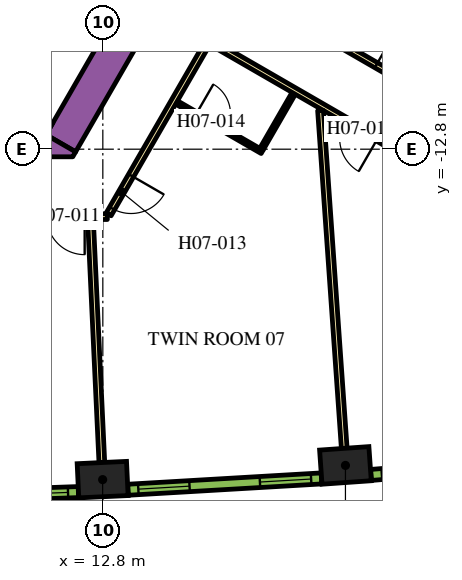
"""IFC4 building model, lengths in metres.
Left out: names, types, materials, properties, quantities, classifications, styles, units other than length and angle.
Written with IfcOpenShell. Run it as: python <this file> out.ifc"""

import sys

from ifc_helpers import new_model, si_unit, direction, frame, frame_2d, origin, origin_2d, place, context, subcontext, project, spatial, polyline, rectangle, outline, extrude, element, fill, save


model = new_model("IFC4")
c1 = context("Model", 3, precision=1e-05, world=origin(), true_north=direction((0.0, 1.0)))
c2 = subcontext(c1, "Body", "Model", "MODEL_VIEW")
j1 = project(units=[si_unit("LENGTHUNIT", "METRE"), si_unit("PLANEANGLEUNIT", "RADIAN")], contexts=[c1])
p1 = place(None, origin())
s1 = spatial("IfcSite", under=j1, at=p1, CompositionType="ELEMENT")
p2 = place(p1, origin())
s2 = spatial("IfcBuilding", under=s1, at=p2, CompositionType="ELEMENT")
p3 = place(p2, frame((0.0, 0.0, 95.4)))
s3 = spatial("IfcBuildingStorey", under=s2, at=p3, CompositionType="ELEMENT", Elevation=95.4)
for number, where, z_axis, x_axis in (
    (1, (12.795, -21.494, 0.0), (0.0, 0.0, 1.0), (0.999, 0.047, 0.0)),
    (2, (19.184, -21.12, 0.0), (0.0, 0.0, 1.0), (0.998, 0.07, 0.0)),
):
    element("IfcColumn", number, at=place(p3, frame(where, z_axis=z_axis, x_axis=x_axis)), inside=s3, PredefinedType="COLUMN", context=c2, shape_type="SweptSolid", body=[
        extrude(rectangle(XDim=1.3, YDim=0.9, at=origin_2d()), origin(), (0.0, 0.0, 1.0), 3.9),
    ])
p4 = place(p3, frame((11.695, -12.644, 0.0), z_axis=(0.0, 0.0, 1.0), x_axis=(0.500010229568, 0.86601949766, 0.0)))
e3 = element("IfcWall", 3, at=p4, inside=s3, PredefinedType="SOLIDWALL", context=c2, shape_type="SweptSolid", body=[
    extrude(rectangle(XDim=9.326, YDim=0.9, at=frame_2d((4.663, 0.0))), origin(), (0.0, 0.0, 1.0), 3.9),
])
p5 = place(p3, origin())
e4 = element("IfcWall", 4, at=p5, inside=s3, PredefinedType="SOLIDWALL", context=c2, shape_type="SweptSolid", body=[
    extrude(outline(polyline([(12.009, -13.0), (11.312, -13.0), (11.312, -12.425), (12.083, -12.871), (12.009, -13.0)])), origin(), (0.0, 0.0, 1.0), 3.9),
])
e5 = element("IfcWall", 5, at=p5, inside=s3, PredefinedType="SOLIDWALL", context=c2, shape_type="SweptSolid", body=[
    extrude(outline(polyline([(11.489, -12.1), (11.312, -12.407), (11.312, -12.1), (11.489, -12.1)])), origin(), (0.0, 0.0, 1.0), 3.9),
])
p6 = place(p3, frame((16.412, -8.523, 0.0), z_axis=(0.0, 0.0, 1.0), x_axis=(0.866025629663, -0.499999608766, 0.0)))
e6 = element("IfcWall", 6, at=p6, inside=s3, PredefinedType="PARTITIONING", context=c2, shape_type="SweptSolid", body=[
    extrude(rectangle(XDim=13.624, YDim=0.15, at=frame_2d((6.812, 0.0))), origin(), (0.0, 0.0, 1.0), 2.75),
])
p7 = place(p6, frame((4.134, 0.0, 0.0)))
e7 = element("IfcOpeningElement", 7, at=p7, cuts=e6, PredefinedType="OPENING", context=c2, shape_type="SweptSolid", body=[
    extrude(rectangle(XDim=1.0, YDim=2.1, at=frame_2d((0.5, 1.05))), frame((0.0, 0.085, 0.0), z_axis=(0.0, -1.0, 0.0), x_axis=(1.0, 0.0, 0.0)), (0.0, 0.0, 1.0), 0.17),
])
p8 = place(p3, frame((12.918, -14.575, 0.0), z_axis=(0.0, 0.0, 1.0), x_axis=(-1.0, 0.0, 0.0)))
e8 = element("IfcWall", 8, at=p8, inside=s3, PredefinedType="PARTITIONING", context=c2, shape_type="SweptSolid", body=[
    extrude(rectangle(XDim=25.766, YDim=0.15, at=frame_2d((12.883, 0.0))), origin(), (0.0, 0.0, 1.0), 2.75),
])
p9 = place(p8, frame((24.24, 0.0, 0.0)))
e9 = element("IfcOpeningElement", 9, at=p9, cuts=e8, PredefinedType="OPENING", context=c2, shape_type="SweptSolid", body=[
    extrude(rectangle(XDim=1.0, YDim=2.1, at=frame_2d((0.5, 1.05))), frame((0.0, 0.085, 0.0), z_axis=(0.0, -1.0, 0.0), x_axis=(1.0, 0.0, 0.0)), (0.0, 0.0, 1.0), 0.17),
])
p10 = place(p8, frame((13.144, 0.0, 0.0)))
e10 = element("IfcOpeningElement", 10, at=p10, cuts=e8, PredefinedType="OPENING", context=c2, shape_type="SweptSolid", body=[
    extrude(rectangle(XDim=1.0, YDim=2.1, at=frame_2d((0.5, 1.05))), frame((0.0, 0.085, 0.0), z_axis=(0.0, -1.0, 0.0), x_axis=(1.0, 0.0, 0.0)), (0.0, 0.0, 1.0), 0.17),
])
p11 = place(p8, frame((11.693, 0.0, 0.0)))
e11 = element("IfcOpeningElement", 11, at=p11, cuts=e8, PredefinedType="OPENING", context=c2, shape_type="SweptSolid", body=[
    extrude(rectangle(XDim=1.0, YDim=2.1, at=frame_2d((0.5, 1.05))), frame((0.0, 0.085, 0.0), z_axis=(0.0, -1.0, 0.0), x_axis=(1.0, 0.0, 0.0)), (0.0, 0.0, 1.0), 0.17),
])
p12 = place(p8, frame((0.596, 0.0, 0.0)))
e12 = element("IfcOpeningElement", 12, at=p12, cuts=e8, PredefinedType="OPENING", context=c2, shape_type="SweptSolid", body=[
    extrude(rectangle(XDim=1.0, YDim=2.1, at=frame_2d((0.5, 1.05))), frame((0.0, 0.085, 0.0), z_axis=(0.0, -1.0, 0.0), x_axis=(1.0, 0.0, 0.0)), (0.0, 0.0, 1.0), 0.17),
])
p13 = place(p3, frame((15.587, -9.952, 0.0), z_axis=(0.0, 0.0, 1.0), x_axis=(-0.500016618951, -0.866015808616, 0.0)))
e13 = element("IfcWall", 13, at=p13, inside=s3, PredefinedType="PARTITIONING", context=c2, shape_type="SweptSolid", body=[
    extrude(rectangle(XDim=5.268, YDim=0.15, at=frame_2d((2.634, 0.0))), origin(), (0.0, 0.0, 1.0), 2.75),
])
p14 = place(p13, frame((4.088, 0.0, 0.0)))
e14 = element("IfcOpeningElement", 14, at=p14, cuts=e13, PredefinedType="OPENING", context=c2, shape_type="SweptSolid", body=[
    extrude(rectangle(XDim=1.0, YDim=2.1, at=frame_2d((0.5, 1.05))), frame((0.0, 0.085, 0.0), z_axis=(0.0, -1.0, 0.0), x_axis=(1.0, 0.0, 0.0)), (0.0, 0.0, 1.0), 0.17),
])
p15 = place(p3, frame((27.386, -16.764, 0.0), z_axis=(0.0, 0.0, 1.0), x_axis=(-0.866022585856, 0.500004880763, 0.0)))
e15 = element("IfcWall", 15, at=p15, inside=s3, PredefinedType="PARTITIONING", context=c2, shape_type="SweptSolid", body=[
    extrude(rectangle(XDim=13.544, YDim=0.15, at=frame_2d((6.772, 0.0))), origin(), (0.0, 0.0, 1.0), 2.75),
])
p16 = place(p15, frame((8.491, 0.0, 0.0)))
e16 = element("IfcOpeningElement", 16, at=p16, cuts=e15, PredefinedType="OPENING", context=c2, shape_type="SweptSolid", body=[
    extrude(rectangle(XDim=1.0, YDim=2.1, at=frame_2d((0.5, 1.05))), frame((0.0, 0.085, 0.0), z_axis=(0.0, -1.0, 0.0), x_axis=(1.0, 0.0, 0.0)), (0.0, 0.0, 1.0), 0.17),
])
p17 = place(p3, frame((12.774, -21.045, 0.0), z_axis=(0.0, 0.0, 1.0), x_axis=(-0.046750341626, 0.998906605023, 0.0)))
e17 = element("IfcWall", 17, at=p17, inside=s3, PredefinedType="PARTITIONING", context=c2, shape_type="SweptSolid", body=[
    extrude(rectangle(XDim=6.392, YDim=0.15, at=frame_2d((3.196, 0.0))), origin(), (0.0, 0.0, 1.0), 2.75),
])
p18 = place(p3, frame((19.153, -20.671, 0.0), z_axis=(0.0, 0.0, 1.0), x_axis=(-0.070070736723, 0.997542025107, 0.0)))
e18 = element("IfcWall", 18, at=p18, inside=s3, PredefinedType="PARTITIONING", context=c2, shape_type="SweptSolid", body=[
    extrude(rectangle(XDim=8.909, YDim=0.15, at=frame_2d((4.455, 0.0))), origin(), (0.0, 0.0, 1.0), 2.75),
])
p19 = place(p3, frame((14.74, -11.57, 0.0), z_axis=(0.0, 0.0, 1.0), x_axis=(0.866021400173, -0.500006934395, 0.0)))
e19 = element("IfcWall", 19, at=p19, inside=s3, PredefinedType="PARTITIONING", context=c2, shape_type="SweptSolid", body=[
    extrude(rectangle(XDim=2.6, YDim=0.1, at=frame_2d((1.3, 0.0))), origin(), (0.0, 0.0, 1.0), 2.75),
])
p20 = place(p19, frame((0.6, 0.0, 0.0)))
e20 = element("IfcOpeningElement", 20, at=p20, cuts=e19, PredefinedType="OPENING", context=c2, shape_type="SweptSolid", body=[
    extrude(rectangle(XDim=0.9, YDim=2.1, at=frame_2d((0.45, 1.05))), frame((0.0, 0.06, 0.0), z_axis=(0.0, -1.0, 0.0), x_axis=(1.0, 0.0, 0.0)), (0.0, 0.0, 1.0), 0.12),
])
p21 = place(p3, frame((16.978, -12.793, 0.0), z_axis=(0.0, 0.0, 1.0), x_axis=(0.500147619332, 0.865940158947, 0.0)))
e21 = element("IfcWall", 21, at=p21, inside=s3, PredefinedType="PARTITIONING", context=c2, shape_type="SweptSolid", body=[
    extrude(rectangle(XDim=1.69, YDim=0.1, at=frame_2d((0.845, 0.0))), origin(), (0.0, 0.0, 1.0), 2.75),
])
p22 = place(p3, frame((7.059, -22.001, 0.0), z_axis=(0.0, 0.0, 1.0), x_axis=(0.999385993957, 0.035037623812, 0.0)))
e22 = element("IfcWall", 22, at=p22, inside=s3, PredefinedType="SOLIDWALL", context=c2, shape_type="SweptSolid", body=[
    extrude(rectangle(XDim=5.101, YDim=0.29, at=frame_2d((2.55, 0.0))), origin(), (0.0, 0.0, 1.0), 3.65),
])
p23 = place(p22, frame((0.273, 0.0, 0.9)))
e23 = element("IfcOpeningElement", 23, at=p23, cuts=e22, PredefinedType="OPENING", context=c2, shape_type="SweptSolid", body=[
    extrude(rectangle(XDim=1.35, YDim=2.15, at=frame_2d((0.675, 1.075))), frame((0.0, 0.155, 0.0), z_axis=(0.0, -1.0, 0.0), x_axis=(1.0, 0.0, 0.0)), (0.0, 0.0, 1.0), 0.31),
])
p24 = place(p22, frame((3.478, 0.0, 0.9)))
e24 = element("IfcOpeningElement", 24, at=p24, cuts=e22, PredefinedType="OPENING", context=c2, shape_type="SweptSolid", body=[
    extrude(rectangle(XDim=1.35, YDim=2.15, at=frame_2d((0.675, 1.075))), frame((0.0, 0.155, 0.0), z_axis=(0.0, -1.0, 0.0), x_axis=(1.0, 0.0, 0.0)), (0.0, 0.0, 1.0), 0.31),
])
p25 = place(p3, frame((13.462, -21.761, 0.0), z_axis=(0.0, 0.0, 1.0), x_axis=(0.998290511436, 0.058447025388, 0.0)))
e25 = element("IfcWall", 25, at=p25, inside=s3, PredefinedType="SOLIDWALL", context=c2, shape_type="SweptSolid", body=[
    extrude(rectangle(XDim=5.1, YDim=0.29, at=frame_2d((2.55, 0.0))), origin(), (0.0, 0.0, 1.0), 3.65),
])
p26 = place(p25, frame((0.272, 0.0, 0.9)))
e26 = element("IfcOpeningElement", 26, at=p26, cuts=e25, PredefinedType="OPENING", context=c2, shape_type="SweptSolid", body=[
    extrude(rectangle(XDim=1.35, YDim=2.15, at=frame_2d((0.675, 1.075))), frame((0.0, 0.155, 0.0), z_axis=(0.0, -1.0, 0.0), x_axis=(1.0, 0.0, 0.0)), (0.0, 0.0, 1.0), 0.31),
])
p27 = place(p25, frame((3.478, 0.0, 0.9)))
e27 = element("IfcOpeningElement", 27, at=p27, cuts=e25, PredefinedType="OPENING", context=c2, shape_type="SweptSolid", body=[
    extrude(rectangle(XDim=1.35, YDim=2.15, at=frame_2d((0.675, 1.075))), frame((0.0, 0.155, 0.0), z_axis=(0.0, -1.0, 0.0), x_axis=(1.0, 0.0, 0.0)), (0.0, 0.0, 1.0), 0.31),
])
p28 = place(p3, frame((19.857, -21.371, 0.0), z_axis=(0.0, 0.0, 1.0), x_axis=(0.99665273362, 0.081751627308, 0.0)))
e28 = element("IfcWall", 28, at=p28, inside=s3, PredefinedType="SOLIDWALL", context=c2, shape_type="SweptSolid", body=[
    extrude(rectangle(XDim=5.107, YDim=0.29, at=frame_2d((2.553, 0.0))), origin(), (0.0, 0.0, 1.0), 3.65),
])
p29 = place(p28, frame((0.285, 0.0, 0.9)))
e29 = element("IfcOpeningElement", 29, at=p29, cuts=e28, PredefinedType="OPENING", context=c2, shape_type="SweptSolid", body=[
    extrude(rectangle(XDim=1.35, YDim=2.15, at=frame_2d((0.675, 1.075))), frame((0.0, 0.155, 0.0), z_axis=(0.0, -1.0, 0.0), x_axis=(1.0, 0.0, 0.0)), (0.0, 0.0, 1.0), 0.31),
])
p30 = place(p28, frame((3.516, 0.0, 0.9)))
e30 = element("IfcOpeningElement", 30, at=p30, cuts=e28, PredefinedType="OPENING", context=c2, shape_type="SweptSolid", body=[
    extrude(rectangle(XDim=1.35, YDim=2.15, at=frame_2d((0.675, 1.075))), frame((0.0, 0.155, 0.0), z_axis=(0.0, -1.0, 0.0), x_axis=(1.0, 0.0, 0.0)), (0.0, 0.0, 1.0), 0.31),
])
p31 = place(p12, origin())
e31 = element("IfcDoor", 31, at=p31, inside=s3, OperationType="SINGLE_SWING_LEFT", PredefinedType="DOOR", context=c2, shape_type="SweptSolid", body=[
    extrude(rectangle(XDim=1.0, YDim=2.1, at=frame_2d((0.5, 1.05))), frame((0.0, 0.025, 0.0), z_axis=(0.0, -1.0, 0.0), x_axis=(1.0, 0.0, 0.0)), (0.0, 0.0, 1.0), 0.05),
])
fill(e12, e31)
p32 = place(p14, origin())
e32 = element("IfcDoor", 32, at=p32, inside=s3, OperationType="SINGLE_SWING_RIGHT", PredefinedType="DOOR", context=c2, shape_type="SweptSolid", body=[
    extrude(rectangle(XDim=1.0, YDim=2.1, at=frame_2d((0.5, 1.05))), frame((0.0, 0.025, 0.0), z_axis=(0.0, -1.0, 0.0), x_axis=(1.0, 0.0, 0.0)), (0.0, 0.0, 1.0), 0.05),
])
fill(e14, e32)
p33 = place(p20, origin())
e33 = element("IfcDoor", 33, at=p33, inside=s3, OperationType="SINGLE_SWING_LEFT", PredefinedType="DOOR", context=c2, shape_type="SweptSolid", body=[
    extrude(rectangle(XDim=0.9, YDim=2.1, at=frame_2d((0.45, 1.05))), frame((0.0, 0.025, 0.0), z_axis=(0.0, -1.0, 0.0), x_axis=(1.0, 0.0, 0.0)), (0.0, 0.0, 1.0), 0.05),
])
fill(e20, e33)
p34 = place(p16, origin())
e34 = element("IfcDoor", 34, at=p34, inside=s3, OperationType="SINGLE_SWING_RIGHT", PredefinedType="DOOR", context=c2, shape_type="SweptSolid", body=[
    extrude(rectangle(XDim=1.0, YDim=2.1, at=frame_2d((0.5, 1.05))), frame((0.0, 0.025, 0.0), z_axis=(0.0, -1.0, 0.0), x_axis=(1.0, 0.0, 0.0)), (0.0, 0.0, 1.0), 0.05),
])
fill(e16, e34)
p35 = place(p7, origin())
e35 = element("IfcDoor", 35, at=p35, inside=s3, OperationType="SINGLE_SWING_LEFT", PredefinedType="DOOR", context=c2, shape_type="SweptSolid", body=[
    extrude(rectangle(XDim=1.0, YDim=2.1, at=frame_2d((0.5, 1.05))), frame((0.0, 0.025, 0.0), z_axis=(0.0, -1.0, 0.0), x_axis=(1.0, 0.0, 0.0)), (0.0, 0.0, 1.0), 0.05),
])
fill(e7, e35)
p36 = place(p24, origin())
e36 = element("IfcWindow", 36, at=p36, inside=s3, PartitioningType="DOUBLE_PANEL_VERTICAL", PredefinedType="WINDOW", context=c2, shape_type="SweptSolid", body=[
    extrude(rectangle(XDim=1.35, YDim=2.15, at=frame_2d((0.675, 1.075))), frame((0.0, 0.015, 0.0), z_axis=(0.0, -1.0, 0.0), x_axis=(1.0, 0.0, 0.0)), (0.0, 0.0, 1.0), 0.06),
])
fill(e24, e36)
p37 = place(p26, origin())
e37 = element("IfcWindow", 37, at=p37, inside=s3, PartitioningType="DOUBLE_PANEL_VERTICAL", PredefinedType="WINDOW", context=c2, shape_type="SweptSolid", body=[
    extrude(rectangle(XDim=1.35, YDim=2.15, at=frame_2d((0.675, 1.075))), frame((0.0, 0.015, 0.0), z_axis=(0.0, -1.0, 0.0), x_axis=(1.0, 0.0, 0.0)), (0.0, 0.0, 1.0), 0.06),
])
fill(e26, e37)
p38 = place(p27, origin())
e38 = element("IfcWindow", 38, at=p38, inside=s3, PartitioningType="DOUBLE_PANEL_VERTICAL", PredefinedType="WINDOW", context=c2, shape_type="SweptSolid", body=[
    extrude(rectangle(XDim=1.35, YDim=2.15, at=frame_2d((0.675, 1.075))), frame((0.0, 0.015, 0.0), z_axis=(0.0, -1.0, 0.0), x_axis=(1.0, 0.0, 0.0)), (0.0, 0.0, 1.0), 0.06),
])
fill(e27, e38)
p39 = place(p29, origin())
e39 = element("IfcWindow", 39, at=p39, inside=s3, PartitioningType="DOUBLE_PANEL_VERTICAL", PredefinedType="WINDOW", context=c2, shape_type="SweptSolid", body=[
    extrude(rectangle(XDim=1.35, YDim=2.15, at=frame_2d((0.675, 1.075))), frame((0.0, 0.015, 0.0), z_axis=(0.0, -1.0, 0.0), x_axis=(1.0, 0.0, 0.0)), (0.0, 0.0, 1.0), 0.06),
])
fill(e29, e39)
save(model, sys.argv[1])
